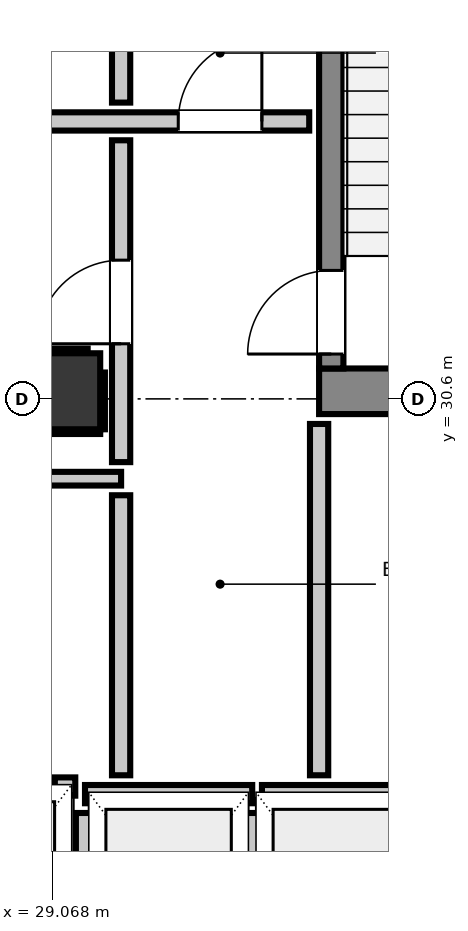
"""IFC4 building model, lengths in metres.
Left out: names, types, materials, properties, quantities, classifications, styles, units other than length and angle.
Written with IfcOpenShell. Run it as: python <this file> out.ifc"""

import sys

from ifc_helpers import new_model, si_unit, direction, frame, frame_2d, origin, origin_2d, place, context, subcontext, project, spatial, rectangle, extrude, element, fill, save


model = new_model("IFC4")
c1 = context("Model", 3, precision=1e-05, world=origin(), true_north=direction((0.0, 1.0)))
c2 = subcontext(c1, "Body", "Model", "MODEL_VIEW")
j1 = project(units=[si_unit("LENGTHUNIT", "METRE"), si_unit("PLANEANGLEUNIT", "RADIAN")], contexts=[c1])
p1 = place(None, origin())
s1 = spatial("IfcSite", under=j1, at=p1, CompositionType="ELEMENT")
p2 = place(p1, origin())
s2 = spatial("IfcBuilding", under=s1, at=p2, CompositionType="ELEMENT")
p3 = place(p2, frame((0.0, 0.0, 149.24)))
s3 = spatial("IfcBuildingStorey", under=s2, at=p3, CompositionType="ELEMENT", Elevation=149.24)
p4 = place(p3, frame((32.58, 30.7, 0.0), z_axis=(0.0, 0.0, 1.0), x_axis=(1.0, 0.0, 0.0)))
e1 = element("IfcWall", 1, at=p4, inside=s3, PredefinedType="SHEAR", context=c2, shape_type="SweptSolid", body=[
    extrude(rectangle(XDim=3.415, YDim=0.6, at=frame_2d((1.708, 0.0))), origin(), (0.0, 0.0, 1.0), 3.32),
])
p5 = place(p3, frame((32.74, 31.0, 0.0), z_axis=(0.0, 0.0, 1.0), x_axis=(0.0, 1.0, 0.0)))
e2 = element("IfcWall", 2, at=p5, inside=s3, PredefinedType="SHEAR", context=c2, shape_type="SweptSolid", body=[
    extrude(rectangle(XDim=7.8, YDim=0.32, at=frame_2d((3.9, 0.0))), origin(), (0.0, 0.0, 1.0), 3.32),
])
p6 = place(p5, frame((0.19, 0.0, 0.0)))
e3 = element("IfcOpeningElement", 3, at=p6, cuts=e2, PredefinedType="OPENING", context=c2, shape_type="SweptSolid", body=[
    extrude(rectangle(XDim=1.1, YDim=2.15, at=frame_2d((0.55, 1.075))), frame((0.0, 0.17, 0.0), z_axis=(0.0, -1.0, 0.0), x_axis=(1.0, 0.0, 0.0)), (0.0, 0.0, 1.0), 0.34),
])
p7 = place(p3, frame((29.2, 30.7, 0.0), z_axis=(0.0, 0.0, 1.0), x_axis=(1.0, 0.0, 0.0)))
e4 = element("IfcColumn", 4, at=p7, inside=s3, PredefinedType="COLUMN", context=c2, shape_type="SweptSolid", body=[
    extrude(rectangle(XDim=1.0, YDim=1.0, at=origin_2d()), origin(), (0.0, 0.0, 1.0), 3.32),
])
p8 = place(p3, frame((29.5, 25.4, 0.0), z_axis=(0.0, 0.0, 1.0), x_axis=(1.0, 0.0, 0.0)))
e5 = element("IfcWall", 5, at=p8, inside=s3, PredefinedType="PARTITIONING", context=c2, shape_type="SweptSolid", body=[
    extrude(rectangle(XDim=2.2, YDim=0.24, at=frame_2d((1.1, 0.0))), origin(), (0.0, 0.0, 1.0), 3.08),
])
p9 = place(p3, frame((29.5, 22.632, 0.0), z_axis=(0.0, 0.0, 1.0), x_axis=(0.0, 1.0, 0.0)))
e6 = element("IfcWall", 6, at=p9, inside=s3, PredefinedType="PARTITIONING", context=c2, shape_type="SweptSolid", body=[
    extrude(rectangle(XDim=2.52, YDim=0.24, at=frame_2d((1.26, 0.0))), origin(), (0.0, 0.0, 1.0), 2.315),
])
p10 = place(p3, frame((31.7, 22.63, 0.0), z_axis=(0.0, 0.0, 1.0), x_axis=(0.0, 1.0, 0.0)))
e7 = element("IfcWall", 7, at=p10, inside=s3, PredefinedType="PARTITIONING", context=c2, shape_type="SweptSolid", body=[
    extrude(rectangle(XDim=2.522, YDim=0.24, at=frame_2d((1.261, 0.0))), origin(), (0.0, 0.0, 1.0), 3.08),
])
p11 = place(p3, frame((31.828, 25.4, 0.0), z_axis=(0.0, 0.0, 1.0), x_axis=(1.0, 0.0, 0.0)))
e8 = element("IfcWall", 8, at=p11, inside=s3, PredefinedType="PARTITIONING", context=c2, shape_type="SweptSolid", body=[
    extrude(rectangle(XDim=2.072, YDim=0.24, at=frame_2d((1.036, 0.0))), origin(), (0.0, 0.0, 1.0), 3.08),
])
p12 = place(p3, frame((29.103, 25.5, 0.0), z_axis=(0.0, 0.0, 1.0), x_axis=(1.0, 0.0, 0.0)))
e9 = element("IfcWall", 9, at=p12, inside=s3, PredefinedType="PARTITIONING", context=c2, shape_type="SweptSolid", body=[
    extrude(rectangle(XDim=0.269, YDim=0.24, at=frame_2d((0.135, 0.0))), origin(), (0.0, 0.0, 1.0), 3.08),
])
p13 = place(p3, frame((28.702, 34.25, 0.0), z_axis=(0.0, 0.0, 1.0), x_axis=(1.0, 0.0, 0.0)))
e10 = element("IfcWall", 10, at=p13, inside=s3, PredefinedType="PARTITIONING", context=c2, shape_type="SweptSolid", body=[
    extrude(rectangle(XDim=3.748, YDim=0.24, at=frame_2d((1.874, 0.0))), origin(), (0.0, 0.0, 1.0), 3.08),
])
p14 = place(p13, frame((2.025, 0.0, 0.0)))
e11 = element("IfcOpeningElement", 11, at=p14, cuts=e10, PredefinedType="OPENING", context=c2, shape_type="SweptSolid", body=[
    extrude(rectangle(XDim=1.1, YDim=2.15, at=frame_2d((0.55, 1.075))), frame((0.0, 0.13, 0.0), z_axis=(0.0, -1.0, 0.0), x_axis=(1.0, 0.0, 0.0)), (0.0, 0.0, 1.0), 0.26),
])
p15 = place(p3, frame((20.65, 29.55, 0.0), z_axis=(0.0, 0.0, 1.0), x_axis=(1.0, 0.0, 0.0)))
e12 = element("IfcWall", 12, at=p15, inside=s3, PredefinedType="PARTITIONING", context=c2, shape_type="SweptSolid", body=[
    extrude(rectangle(XDim=9.325, YDim=0.18, at=frame_2d((4.663, 0.0))), origin(), (0.0, 0.0, 1.0), 3.08),
])
p16 = place(p3, frame((29.975, 25.648, 0.0), z_axis=(0.0, 0.0, 1.0), x_axis=(0.0, 1.0, 0.0)))
e13 = element("IfcWall", 13, at=p16, inside=s3, PredefinedType="PARTITIONING", context=c2, shape_type="SweptSolid", body=[
    extrude(rectangle(XDim=3.684, YDim=0.24, at=frame_2d((1.842, 0.0))), origin(), (0.0, 0.0, 1.0), 3.08),
])
p17 = place(p3, frame((29.975, 29.768, 0.0), z_axis=(0.0, 0.0, 1.0), x_axis=(0.0, 1.0, 0.0)))
e14 = element("IfcWall", 14, at=p17, inside=s3, PredefinedType="PARTITIONING", context=c2, shape_type="SweptSolid", body=[
    extrude(rectangle(XDim=4.234, YDim=0.24, at=frame_2d((2.117, 0.0))), origin(), (0.0, 0.0, 1.0), 3.08),
])
p18 = place(p17, frame((1.557, 0.0, 0.0)))
e15 = element("IfcOpeningElement", 15, at=p18, cuts=e14, PredefinedType="OPENING", context=c2, shape_type="SweptSolid", body=[
    extrude(rectangle(XDim=1.1, YDim=2.15, at=frame_2d((0.55, 1.075))), frame((0.0, 0.13, 0.0), z_axis=(0.0, -1.0, 0.0), x_axis=(1.0, 0.0, 0.0)), (0.0, 0.0, 1.0), 0.26),
])
p19 = place(p3, frame((29.975, 34.498, 0.0), z_axis=(0.0, 0.0, 1.0), x_axis=(0.0, 1.0, 0.0)))
e16 = element("IfcWall", 16, at=p19, inside=s3, PredefinedType="PARTITIONING", context=c2, shape_type="SweptSolid", body=[
    extrude(rectangle(XDim=0.924, YDim=0.24, at=frame_2d((0.462, 0.0))), origin(), (0.0, 0.0, 1.0), 3.08),
])
p20 = place(p3, frame((32.58, 25.648, 0.0), z_axis=(0.0, 0.0, 1.0), x_axis=(0.0, 1.0, 0.0)))
e17 = element("IfcWall", 17, at=p20, inside=s3, PredefinedType="PARTITIONING", context=c2, shape_type="SweptSolid", body=[
    extrude(rectangle(XDim=4.622, YDim=0.24, at=frame_2d((2.311, 0.0))), origin(), (0.0, 0.0, 1.0), 3.08),
])
p21 = place(p3, frame((28.7, 30.168, 0.0), z_axis=(0.0, 0.0, 1.0), x_axis=(1.0, 0.0, 0.0)))
e18 = element("IfcWall", 18, at=p21, inside=s3, PredefinedType="PARTITIONING", context=c2, shape_type="SweptSolid", body=[
    extrude(rectangle(XDim=1.0, YDim=0.06, at=frame_2d((0.5, 0.0))), origin(), (0.0, 0.0, 1.0), 1.45),
])
p22 = place(p3, frame((28.7, 31.232, 0.0), z_axis=(0.0, 0.0, 1.0), x_axis=(1.0, 0.0, 0.0)))
e19 = element("IfcWall", 19, at=p22, inside=s3, PredefinedType="PARTITIONING", context=c2, shape_type="SweptSolid", body=[
    extrude(rectangle(XDim=0.835, YDim=0.06, at=frame_2d((0.417, 0.0))), origin(), (0.0, 0.0, 1.0), 1.45),
])
p23 = place(p3, frame((29.732, 30.2, 0.0), z_axis=(0.0, 0.0, 1.0), x_axis=(0.0, 1.0, 0.0)))
e20 = element("IfcWall", 20, at=p23, inside=s3, PredefinedType="PARTITIONING", context=c2, shape_type="SweptSolid", body=[
    extrude(rectangle(XDim=0.747, YDim=0.06, at=frame_2d((0.374, 0.0))), origin(), (0.0, 0.0, 1.0), 1.45),
])
p24 = place(p6, origin())
e21 = element("IfcDoor", 21, at=p24, inside=s3, OperationType="SINGLE_SWING_LEFT", PredefinedType="DOOR", context=c2, shape_type="SweptSolid", body=[
    extrude(rectangle(XDim=1.1, YDim=2.15, at=frame_2d((0.55, 1.075))), frame((0.0, 0.025, 0.0), z_axis=(0.0, -1.0, 0.0), x_axis=(1.0, 0.0, 0.0)), (0.0, 0.0, 1.0), 0.05),
])
fill(e3, e21)
p25 = place(p18, origin())
e22 = element("IfcDoor", 22, at=p25, inside=s3, OperationType="SINGLE_SWING_LEFT", PredefinedType="DOOR", context=c2, shape_type="SweptSolid", body=[
    extrude(rectangle(XDim=1.1, YDim=2.15, at=frame_2d((0.55, 1.075))), frame((0.0, 0.025, 0.0), z_axis=(0.0, -1.0, 0.0), x_axis=(1.0, 0.0, 0.0)), (0.0, 0.0, 1.0), 0.05),
])
fill(e15, e22)
p26 = place(p14, origin())
e23 = element("IfcDoor", 23, at=p26, inside=s3, OperationType="SINGLE_SWING_RIGHT", PredefinedType="DOOR", context=c2, shape_type="SweptSolid", body=[
    extrude(rectangle(XDim=1.1, YDim=2.15, at=frame_2d((0.55, 1.075))), frame((0.0, 0.025, 0.0), z_axis=(0.0, -1.0, 0.0), x_axis=(1.0, 0.0, 0.0)), (0.0, 0.0, 1.0), 0.05),
])
fill(e11, e23)
save(model, sys.argv[1])
